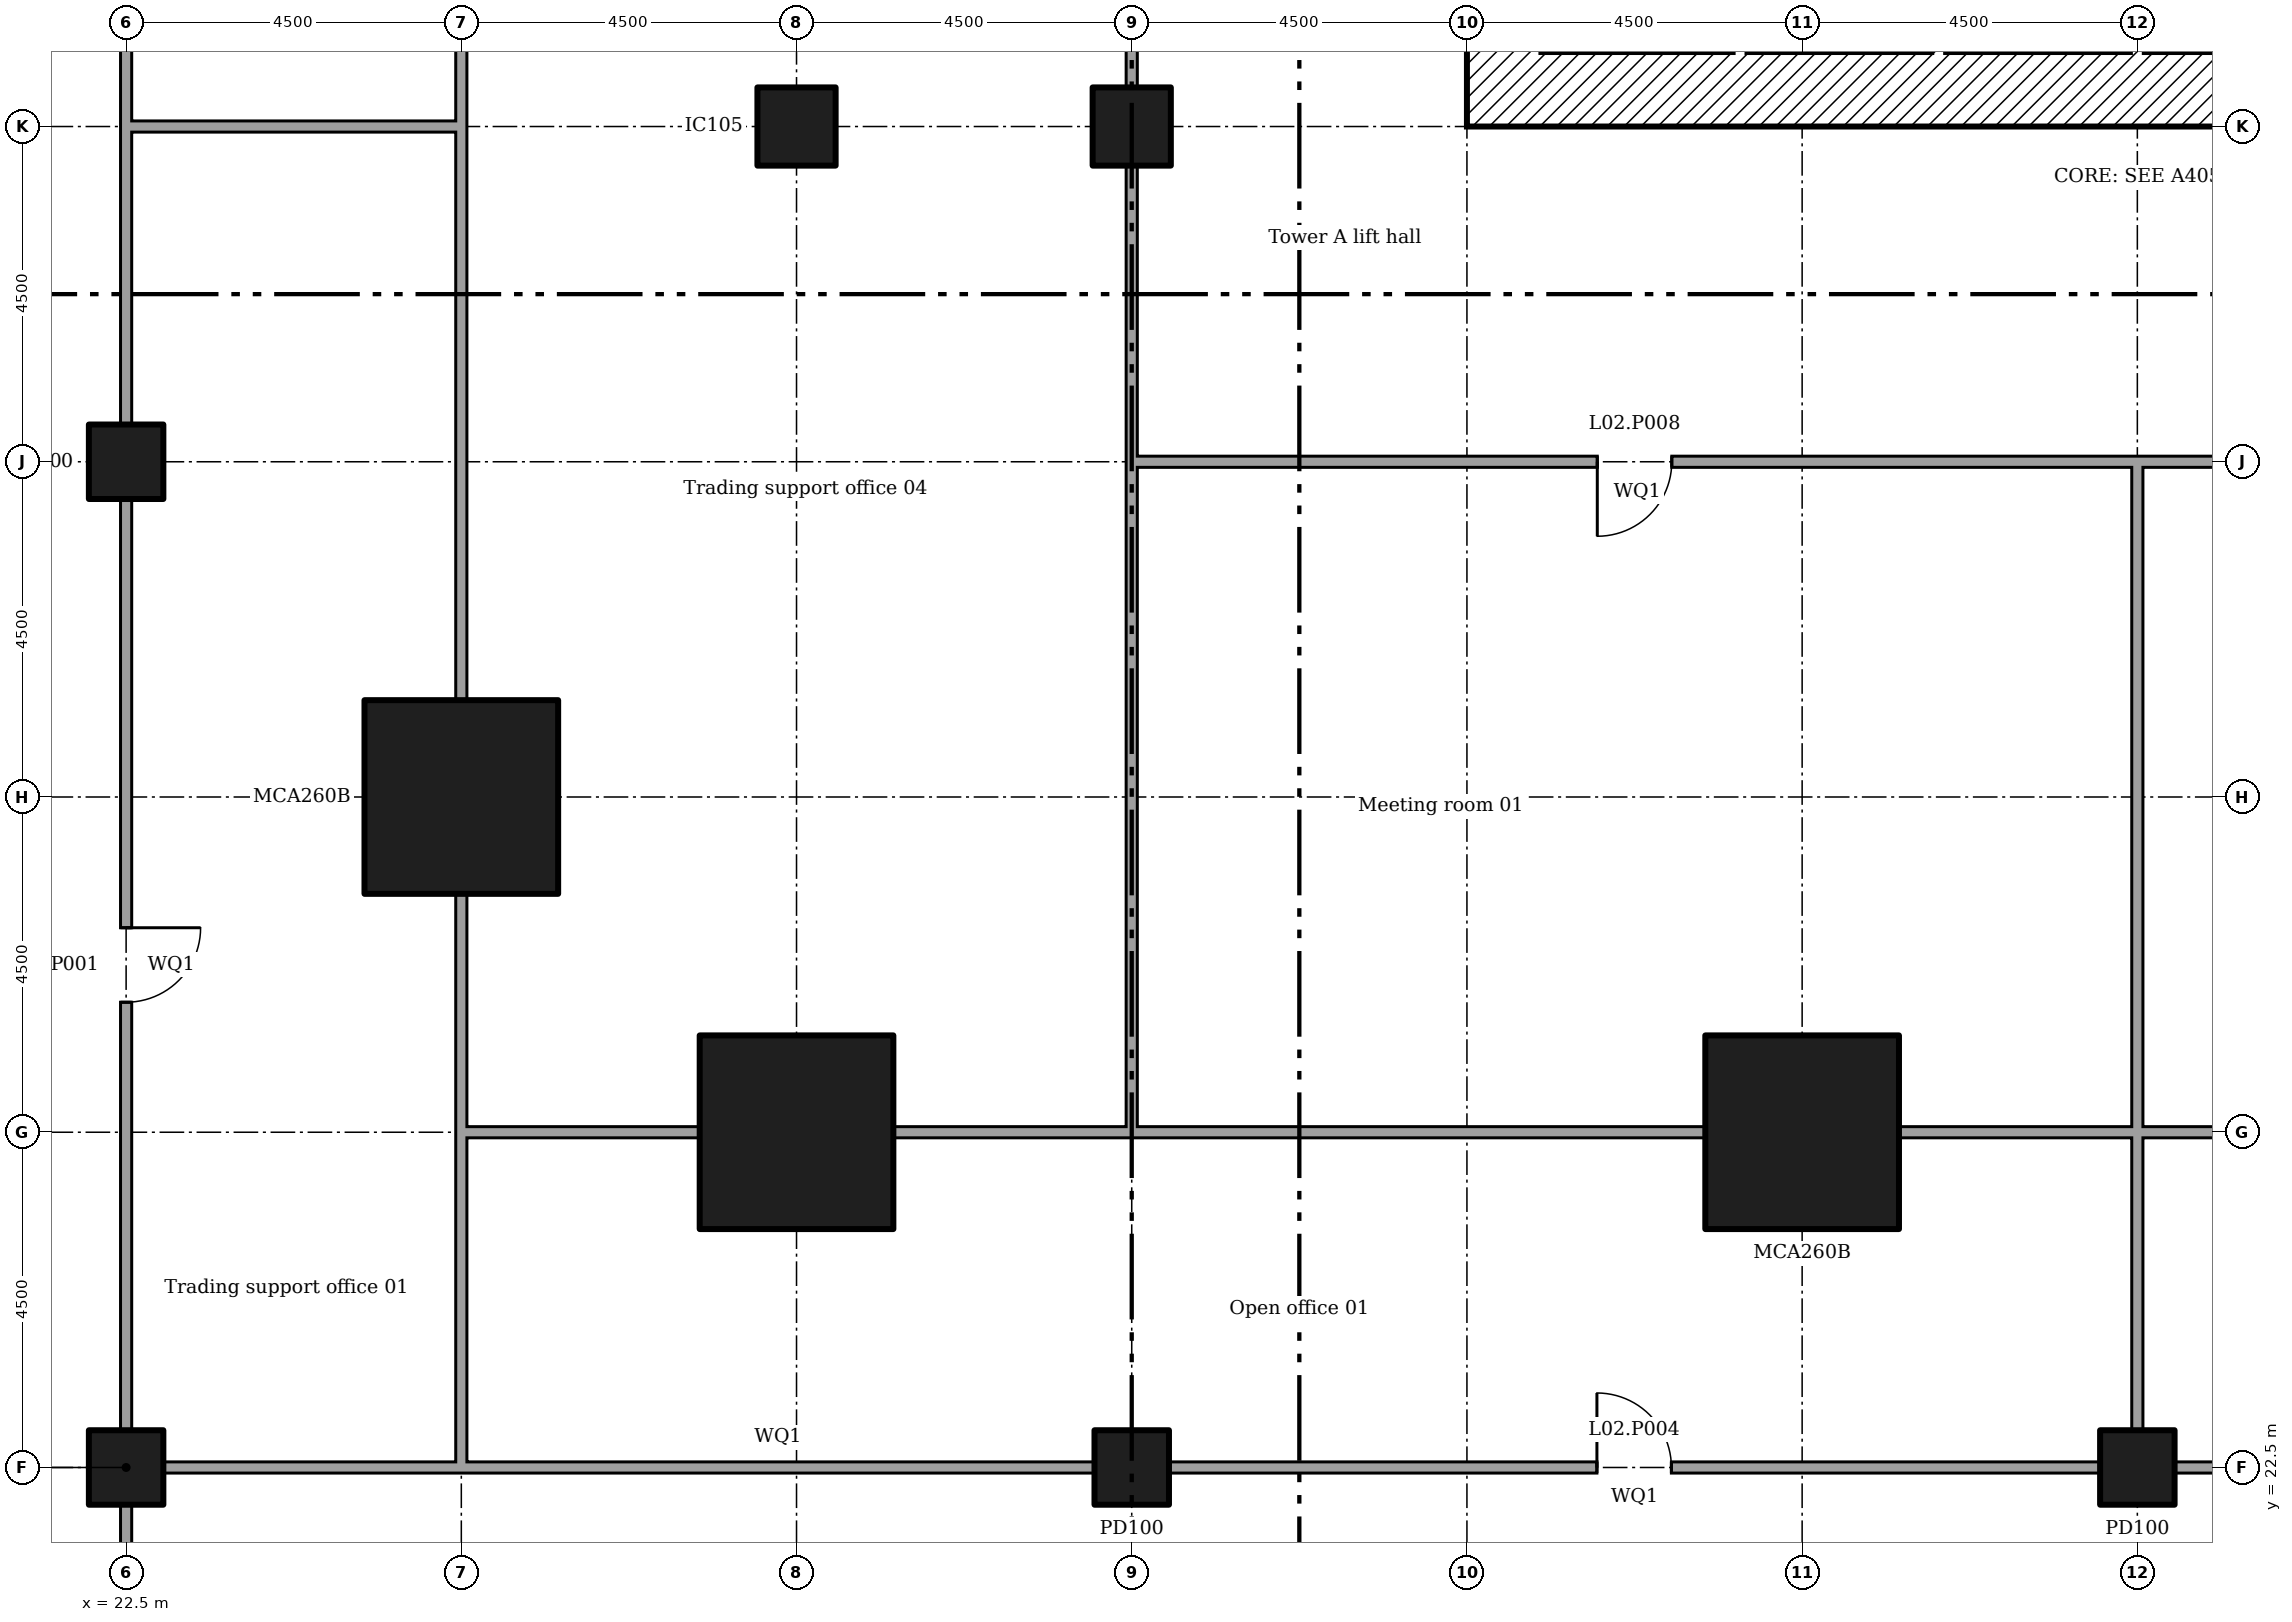
"""IFC4 building model, lengths in metres.
Left out: names, types, materials, properties, quantities, classifications, styles, units other than length and angle.
Written with IfcOpenShell. Run it as: python <this file> out.ifc"""

import sys

from ifc_helpers import new_model, si_unit, direction, frame, frame_2d, origin, origin_2d, place, context, subcontext, project, spatial, rectangle, extrude, element, fill, save


model = new_model("IFC4")
c1 = context("Model", 3, precision=1e-05, world=origin(), true_north=direction((0.0, 1.0)))
c2 = subcontext(c1, "Body", "Model", "MODEL_VIEW")
j1 = project(units=[si_unit("LENGTHUNIT", "METRE"), si_unit("PLANEANGLEUNIT", "RADIAN")], contexts=[c1])
p1 = place(None, origin())
s1 = spatial("IfcSite", under=j1, at=p1, CompositionType="ELEMENT")
p2 = place(p1, origin())
s2 = spatial("IfcBuilding", under=s1, at=p2, CompositionType="ELEMENT")
p3 = place(p2, frame((0.0, 0.0, 11.5)))
s3 = spatial("IfcBuildingStorey", under=s2, at=p3, CompositionType="ELEMENT", Elevation=11.5)
for number, where in (
    (1, (27.0, 31.5, 0.0)),
    (2, (31.5, 27.0, 0.0)),
    (3, (45.0, 27.0, 0.0)),
):
    element("IfcColumn", number, at=place(p3, frame(where)), inside=s3, PredefinedType="COLUMN", context=c2, shape_type="SweptSolid", body=[
        extrude(rectangle(XDim=2.6, YDim=2.6, at=origin_2d()), origin(), (0.0, 0.0, 1.0), 5.0),
    ])
for number, where in (
    (4, (31.5, 40.5, 0.0)),
    (5, (36.0, 40.5, 0.0)),
):
    element("IfcColumn", number, at=place(p3, frame(where)), inside=s3, PredefinedType="COLUMN", context=c2, shape_type="SweptSolid", body=[
        extrude(rectangle(XDim=1.05, YDim=1.05, at=origin_2d()), origin(), (0.0, 0.0, 1.0), 5.0),
    ])
for number, where in (
    (6, (22.5, 22.5, 0.0)),
    (7, (22.5, 36.0, 0.0)),
    (8, (36.0, 22.5, 0.0)),
    (9, (49.5, 22.5, 0.0)),
):
    element("IfcColumn", number, at=place(p3, frame(where)), inside=s3, PredefinedType="COLUMN", context=c2, shape_type="SweptSolid", body=[
        extrude(rectangle(XDim=1.0, YDim=1.0, at=origin_2d()), origin(), (0.0, 0.0, 1.0), 5.0),
    ])
p4 = place(p3, frame((41.5, 41.0, 0.0)))
e10 = element("IfcWall", 10, at=p4, inside=s3, PredefinedType="SHEAR", context=c2, shape_type="SweptSolid", body=[
    extrude(rectangle(XDim=16.0, YDim=1.0, at=frame_2d((8.0, 0.0))), origin(), (0.0, 0.0, 1.0), 4.5),
])
p5 = place(p3, frame((41.0, 40.5, 0.0), z_axis=(0.0, 0.0, 1.0), x_axis=(0.0, 1.0, 0.0)))
e11 = element("IfcWall", 11, at=p5, inside=s3, PredefinedType="SHEAR", context=c2, shape_type="SweptSolid", body=[
    extrude(rectangle(XDim=18.0, YDim=1.0, at=frame_2d((9.0, 0.0))), origin(), (0.0, 0.0, 1.0), 4.5),
])
p6 = place(p5, frame((3.65, 0.0, 0.0)))
e12 = element("IfcOpeningElement", 12, at=p6, cuts=e11, PredefinedType="OPENING", context=c2, shape_type="SweptSolid", body=[
    extrude(rectangle(XDim=1.2, YDim=2.1, at=frame_2d((0.6, 1.05))), frame((0.0, 0.51, 0.0), z_axis=(0.0, -1.0, 0.0), x_axis=(1.0, 0.0, 0.0)), (0.0, 0.0, 1.0), 1.02),
])
p7 = place(p5, frame((5.475, 0.0, 0.0)))
e13 = element("IfcOpeningElement", 13, at=p7, cuts=e11, PredefinedType="OPENING", context=c2, shape_type="SweptSolid", body=[
    extrude(rectangle(XDim=1.0, YDim=2.1, at=frame_2d((0.5, 1.05))), frame((0.0, 0.51, 0.0), z_axis=(0.0, -1.0, 0.0), x_axis=(1.0, 0.0, 0.0)), (0.0, 0.0, 1.0), 1.02),
])
p8 = place(p5, frame((12.3, 0.0, 0.0)))
e14 = element("IfcOpeningElement", 14, at=p8, cuts=e11, PredefinedType="OPENING", context=c2, shape_type="SweptSolid", body=[
    extrude(rectangle(XDim=1.0, YDim=2.1, at=frame_2d((0.5, 1.05))), frame((0.0, 0.51, 0.0), z_axis=(0.0, -1.0, 0.0), x_axis=(1.0, 0.0, 0.0)), (0.0, 0.0, 1.0), 1.02),
])
for number, where, z_axis, x_axis in (
    (15, (44.167, 41.5, 0.0), (0.0, 0.0, 1.0), (0.0, 1.0, 0.0)),
    (16, (46.833, 41.5, 0.0), (0.0, 0.0, 1.0), (0.0, 1.0, 0.0)),
    (17, (49.5, 41.5, 0.0), (0.0, 0.0, 1.0), (0.0, 1.0, 0.0)),
):
    element("IfcWall", number, at=place(p3, frame(where, z_axis=z_axis, x_axis=x_axis)), inside=s3, PredefinedType="SHEAR", context=c2, shape_type="SweptSolid", body=[
        extrude(rectangle(XDim=2.3, YDim=0.2, at=frame_2d((1.15, 0.0))), origin(), (0.0, 0.0, 1.0), 4.5),
    ])
p9 = place(p3, frame((22.5, 18.3, 0.0), z_axis=(0.0, 0.0, 1.0), x_axis=(0.0, 1.0, 0.0)))
e18 = element("IfcWall", 18, at=p9, inside=s3, PredefinedType="PARTITIONING", context=c2, shape_type="SweptSolid", body=[
    extrude(rectangle(XDim=3.705, YDim=0.15, at=frame_2d((1.853, 0.0))), origin(), (0.0, 0.0, 1.0), 4.55),
])
p10 = place(p9, frame((1.25, 0.0, 0.0)))
e19 = element("IfcOpeningElement", 19, at=p10, cuts=e18, PredefinedType="OPENING", context=c2, shape_type="SweptSolid", body=[
    extrude(rectangle(XDim=1.2, YDim=2.1, at=frame_2d((0.6, 1.05))), frame((0.0, 0.085, 0.0), z_axis=(0.0, -1.0, 0.0), x_axis=(1.0, 0.0, 0.0)), (0.0, 0.0, 1.0), 0.17),
])
p11 = place(p3, frame((22.5, 22.995, 0.0), z_axis=(0.0, 0.0, 1.0), x_axis=(0.0, 1.0, 0.0)))
e20 = element("IfcWall", 20, at=p11, inside=s3, PredefinedType="PARTITIONING", context=c2, shape_type="SweptSolid", body=[
    extrude(rectangle(XDim=12.51, YDim=0.15, at=frame_2d((6.255, 0.0))), origin(), (0.0, 0.0, 1.0), 4.55),
])
p12 = place(p11, frame((5.75, 0.0, 0.0)))
e21 = element("IfcOpeningElement", 21, at=p12, cuts=e20, PredefinedType="OPENING", context=c2, shape_type="SweptSolid", body=[
    extrude(rectangle(XDim=1.0, YDim=2.1, at=frame_2d((0.5, 1.05))), frame((0.0, 0.085, 0.0), z_axis=(0.0, -1.0, 0.0), x_axis=(1.0, 0.0, 0.0)), (0.0, 0.0, 1.0), 0.17),
])
p13 = place(p3, frame((22.5, 36.495, 0.0), z_axis=(0.0, 0.0, 1.0), x_axis=(0.0, 1.0, 0.0)))
e22 = element("IfcWall", 22, at=p13, inside=s3, PredefinedType="PARTITIONING", context=c2, shape_type="SweptSolid", body=[
    extrude(rectangle(XDim=4.08, YDim=0.15, at=frame_2d((2.04, 0.0))), origin(), (0.0, 0.0, 1.0), 4.55),
])
p14 = place(p3, frame((22.5, 40.5, 0.0), z_axis=(0.0, 0.0, 1.0), x_axis=(0.0, 1.0, 0.0)))
e23 = element("IfcWall", 23, at=p14, inside=s3, PredefinedType="PARTITIONING", context=c2, shape_type="SweptSolid", body=[
    extrude(rectangle(XDim=8.505, YDim=0.15, at=frame_2d((4.252, 0.0))), origin(), (0.0, 0.0, 1.0), 4.55),
])
p15 = place(p14, frame((3.75, 0.0, 0.0)))
e24 = element("IfcOpeningElement", 24, at=p15, cuts=e23, PredefinedType="OPENING", context=c2, shape_type="SweptSolid", body=[
    extrude(rectangle(XDim=1.0, YDim=2.1, at=frame_2d((0.5, 1.05))), frame((0.0, 0.085, 0.0), z_axis=(0.0, -1.0, 0.0), x_axis=(1.0, 0.0, 0.0)), (0.0, 0.0, 1.0), 0.17),
])
p16 = place(p3, frame((22.995, 22.5, 0.0)))
e25 = element("IfcWall", 25, at=p16, inside=s3, PredefinedType="PARTITIONING", context=c2, shape_type="SweptSolid", body=[
    extrude(rectangle(XDim=4.08, YDim=0.15, at=frame_2d((2.04, 0.0))), origin(), (0.0, 0.0, 1.0), 4.55),
])
p17 = place(p3, frame((27.0, 22.5, 0.0)))
e26 = element("IfcWall", 26, at=p17, inside=s3, PredefinedType="PARTITIONING", context=c2, shape_type="SweptSolid", body=[
    extrude(rectangle(XDim=8.505, YDim=0.15, at=frame_2d((4.252, 0.0))), origin(), (0.0, 0.0, 1.0), 4.55),
])
p18 = place(p3, frame((36.495, 22.5, 0.0)))
e27 = element("IfcWall", 27, at=p18, inside=s3, PredefinedType="PARTITIONING", context=c2, shape_type="SweptSolid", body=[
    extrude(rectangle(XDim=12.51, YDim=0.15, at=frame_2d((6.255, 0.0))), origin(), (0.0, 0.0, 1.0), 4.55),
])
p19 = place(p18, frame((5.75, 0.0, 0.0)))
e28 = element("IfcOpeningElement", 28, at=p19, cuts=e27, PredefinedType="OPENING", context=c2, shape_type="SweptSolid", body=[
    extrude(rectangle(XDim=1.0, YDim=2.1, at=frame_2d((0.5, 1.05))), frame((0.0, 0.085, 0.0), z_axis=(0.0, -1.0, 0.0), x_axis=(1.0, 0.0, 0.0)), (0.0, 0.0, 1.0), 0.17),
])
p20 = place(p3, frame((49.995, 22.5, 0.0)))
e29 = element("IfcWall", 29, at=p20, inside=s3, PredefinedType="PARTITIONING", context=c2, shape_type="SweptSolid", body=[
    extrude(rectangle(XDim=12.51, YDim=0.15, at=frame_2d((6.255, 0.0))), origin(), (0.0, 0.0, 1.0), 4.55),
])
p21 = place(p20, frame((5.75, 0.0, 0.0)))
e30 = element("IfcOpeningElement", 30, at=p21, cuts=e29, PredefinedType="OPENING", context=c2, shape_type="SweptSolid", body=[
    extrude(rectangle(XDim=1.0, YDim=2.1, at=frame_2d((0.5, 1.05))), frame((0.0, 0.085, 0.0), z_axis=(0.0, -1.0, 0.0), x_axis=(1.0, 0.0, 0.0)), (0.0, 0.0, 1.0), 0.17),
])
p22 = place(p3, frame((22.575, 40.5, 0.0)))
e31 = element("IfcWall", 31, at=p22, inside=s3, PredefinedType="PARTITIONING", context=c2, shape_type="SweptSolid", body=[
    extrude(rectangle(XDim=4.5, YDim=0.15, at=frame_2d((2.25, 0.0))), origin(), (0.0, 0.0, 1.0), 4.55),
])
p23 = place(p3, frame((27.0, 22.575, 0.0), z_axis=(0.0, 0.0, 1.0), x_axis=(0.0, 1.0, 0.0)))
e32 = element("IfcWall", 32, at=p23, inside=s3, PredefinedType="PARTITIONING", context=c2, shape_type="SweptSolid", body=[
    extrude(rectangle(XDim=4.5, YDim=0.15, at=frame_2d((2.25, 0.0))), origin(), (0.0, 0.0, 1.0), 4.55),
])
p24 = place(p3, frame((27.0, 27.0, 0.0), z_axis=(0.0, 0.0, 1.0), x_axis=(0.0, 1.0, 0.0)))
e33 = element("IfcWall", 33, at=p24, inside=s3, PredefinedType="PARTITIONING", context=c2, shape_type="SweptSolid", body=[
    extrude(rectangle(XDim=3.205, YDim=0.15, at=frame_2d((1.603, 0.0))), origin(), (0.0, 0.0, 1.0), 4.55),
])
p25 = place(p3, frame((27.0, 32.795, 0.0), z_axis=(0.0, 0.0, 1.0), x_axis=(0.0, 1.0, 0.0)))
e34 = element("IfcWall", 34, at=p25, inside=s3, PredefinedType="PARTITIONING", context=c2, shape_type="SweptSolid", body=[
    extrude(rectangle(XDim=7.63, YDim=0.15, at=frame_2d((3.815, 0.0))), origin(), (0.0, 0.0, 1.0), 4.55),
])
p26 = place(p3, frame((27.0, 40.5, 0.0), z_axis=(0.0, 0.0, 1.0), x_axis=(0.0, 1.0, 0.0)))
e35 = element("IfcWall", 35, at=p26, inside=s3, PredefinedType="PARTITIONING", context=c2, shape_type="SweptSolid", body=[
    extrude(rectangle(XDim=3.205, YDim=0.15, at=frame_2d((1.603, 0.0))), origin(), (0.0, 0.0, 1.0), 4.55),
])
p27 = place(p3, frame((49.5, 22.995, 0.0), z_axis=(0.0, 0.0, 1.0), x_axis=(0.0, 1.0, 0.0)))
e36 = element("IfcWall", 36, at=p27, inside=s3, PredefinedType="PARTITIONING", context=c2, shape_type="SweptSolid", body=[
    extrude(rectangle(XDim=4.08, YDim=0.15, at=frame_2d((2.04, 0.0))), origin(), (0.0, 0.0, 1.0), 4.55),
])
p28 = place(p3, frame((35.925, 27.0, 0.0)))
e37 = element("IfcWall", 37, at=p28, inside=s3, PredefinedType="PARTITIONING", context=c2, shape_type="SweptSolid", body=[
    extrude(rectangle(XDim=7.78, YDim=0.15, at=frame_2d((3.89, 0.0))), origin(), (0.0, 0.0, 1.0), 4.55),
])
p29 = place(p3, frame((46.295, 27.0, 0.0)))
e38 = element("IfcWall", 38, at=p29, inside=s3, PredefinedType="PARTITIONING", context=c2, shape_type="SweptSolid", body=[
    extrude(rectangle(XDim=3.28, YDim=0.15, at=frame_2d((1.64, 0.0))), origin(), (0.0, 0.0, 1.0), 4.55),
])
p30 = place(p3, frame((27.075, 27.0, 0.0)))
e39 = element("IfcWall", 39, at=p30, inside=s3, PredefinedType="PARTITIONING", context=c2, shape_type="SweptSolid", body=[
    extrude(rectangle(XDim=3.13, YDim=0.15, at=frame_2d((1.565, 0.0))), origin(), (0.0, 0.0, 1.0), 4.55),
])
p31 = place(p3, frame((32.795, 27.0, 0.0)))
e40 = element("IfcWall", 40, at=p31, inside=s3, PredefinedType="PARTITIONING", context=c2, shape_type="SweptSolid", body=[
    extrude(rectangle(XDim=3.205, YDim=0.15, at=frame_2d((1.603, 0.0))), origin(), (0.0, 0.0, 1.0), 4.55),
])
p32 = place(p3, frame((49.575, 27.0, 0.0)))
e41 = element("IfcWall", 41, at=p32, inside=s3, PredefinedType="PARTITIONING", context=c2, shape_type="SweptSolid", body=[
    extrude(rectangle(XDim=7.63, YDim=0.15, at=frame_2d((3.815, 0.0))), origin(), (0.0, 0.0, 1.0), 4.55),
])
for number, where, z_axis, x_axis in (
    (42, (49.5, 27.075, 0.0), (0.0, 0.0, 1.0), (0.0, 1.0, 0.0)),
    (43, (36.0, 27.075, 0.0), (0.0, 0.0, 1.0), (0.0, 1.0, 0.0)),
):
    element("IfcWall", number, at=place(p3, frame(where, z_axis=z_axis, x_axis=x_axis)), inside=s3, PredefinedType="PARTITIONING", context=c2, shape_type="SweptSolid", body=[
        extrude(rectangle(XDim=9.0, YDim=0.15, at=frame_2d((4.5, 0.0))), origin(), (0.0, 0.0, 1.0), 4.55),
    ])
p33 = place(p3, frame((36.075, 36.0, 0.0)))
e44 = element("IfcWall", 44, at=p33, inside=s3, PredefinedType="PARTITIONING", context=c2, shape_type="SweptSolid", body=[
    extrude(rectangle(XDim=13.425, YDim=0.15, at=frame_2d((6.712, 0.0))), origin(), (0.0, 0.0, 1.0), 4.55),
])
p34 = place(p33, frame((6.175, 0.0, 0.0)))
e45 = element("IfcOpeningElement", 45, at=p34, cuts=e44, PredefinedType="OPENING", context=c2, shape_type="SweptSolid", body=[
    extrude(rectangle(XDim=1.0, YDim=2.1, at=frame_2d((0.5, 1.05))), frame((0.0, 0.085, 0.0), z_axis=(0.0, -1.0, 0.0), x_axis=(1.0, 0.0, 0.0)), (0.0, 0.0, 1.0), 0.17),
])
p35 = place(p3, frame((49.575, 36.0, 0.0)))
e46 = element("IfcWall", 46, at=p35, inside=s3, PredefinedType="PARTITIONING", context=c2, shape_type="SweptSolid", body=[
    extrude(rectangle(XDim=8.405, YDim=0.15, at=frame_2d((4.203, 0.0))), origin(), (0.0, 0.0, 1.0), 4.55),
])
p36 = place(p3, frame((36.0, 36.0, 0.0), z_axis=(0.0, 0.0, 1.0), x_axis=(0.0, 1.0, 0.0)))
e47 = element("IfcWall", 47, at=p36, inside=s3, PredefinedType="PARTITIONING", context=c2, shape_type="SweptSolid", body=[
    extrude(rectangle(XDim=3.98, YDim=0.15, at=frame_2d((1.99, 0.0))), origin(), (0.0, 0.0, 1.0), 4.55),
])
p37 = place(p3, frame((36.0, 41.02, 0.0), z_axis=(0.0, 0.0, 1.0), x_axis=(0.0, 1.0, 0.0)))
e48 = element("IfcWall", 48, at=p37, inside=s3, PredefinedType="PARTITIONING", context=c2, shape_type="SweptSolid", body=[
    extrude(rectangle(XDim=8.405, YDim=0.15, at=frame_2d((4.203, 0.0))), origin(), (0.0, 0.0, 1.0), 4.55),
])
p38 = place(p37, frame((3.75, 0.0, 0.0)))
e49 = element("IfcOpeningElement", 49, at=p38, cuts=e48, PredefinedType="OPENING", context=c2, shape_type="SweptSolid", body=[
    extrude(rectangle(XDim=1.0, YDim=2.1, at=frame_2d((0.5, 1.05))), frame((0.0, 0.085, 0.0), z_axis=(0.0, -1.0, 0.0), x_axis=(1.0, 0.0, 0.0)), (0.0, 0.0, 1.0), 0.17),
])
p39 = place(p12, frame((1.0, 0.0, 0.0), x_axis=(-1.0, 0.0, 0.0)))
e50 = element("IfcDoor", 50, at=p39, inside=s3, OperationType="SINGLE_SWING_RIGHT", PredefinedType="DOOR", context=c2, shape_type="SweptSolid", body=[
    extrude(rectangle(XDim=1.0, YDim=2.1, at=frame_2d((0.5, 1.05))), frame((0.0, 0.025, 0.0), z_axis=(0.0, -1.0, 0.0), x_axis=(1.0, 0.0, 0.0)), (0.0, 0.0, 1.0), 0.05),
])
fill(e21, e50)
p40 = place(p19, origin())
e51 = element("IfcDoor", 51, at=p40, inside=s3, OperationType="SINGLE_SWING_RIGHT", PredefinedType="DOOR", context=c2, shape_type="SweptSolid", body=[
    extrude(rectangle(XDim=1.0, YDim=2.1, at=frame_2d((0.5, 1.05))), frame((0.0, 0.025, 0.0), z_axis=(0.0, -1.0, 0.0), x_axis=(1.0, 0.0, 0.0)), (0.0, 0.0, 1.0), 0.05),
])
fill(e28, e51)
p41 = place(p34, frame((1.0, 0.0, 0.0), x_axis=(-1.0, 0.0, 0.0)))
e52 = element("IfcDoor", 52, at=p41, inside=s3, OperationType="SINGLE_SWING_LEFT", PredefinedType="DOOR", context=c2, shape_type="SweptSolid", body=[
    extrude(rectangle(XDim=1.0, YDim=2.1, at=frame_2d((0.5, 1.05))), frame((0.0, 0.025, 0.0), z_axis=(0.0, -1.0, 0.0), x_axis=(1.0, 0.0, 0.0)), (0.0, 0.0, 1.0), 0.05),
])
fill(e45, e52)
save(model, sys.argv[1])
